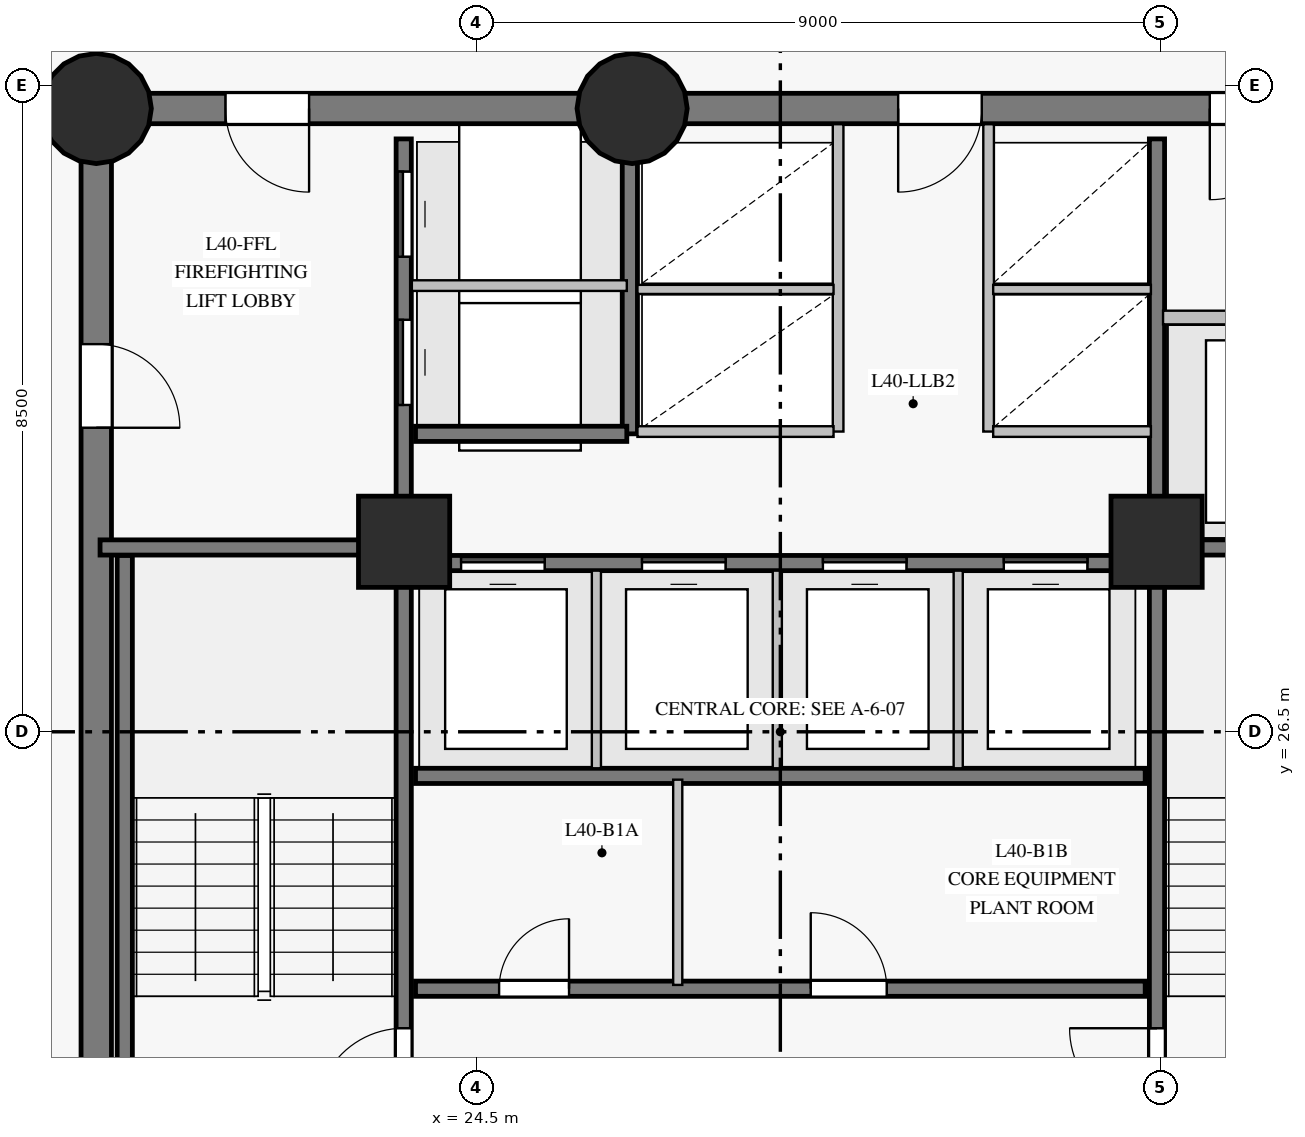
"""IFC4 building model, lengths in metres.
Left out: names, types, materials, properties, quantities, classifications, styles, units other than length and angle.
Written with IfcOpenShell. Run it as: python <this file> out.ifc"""

import sys

from ifc_helpers import new_model, si_unit, direction, frame, frame_2d, origin, origin_with_axes, origin_2d, place, context, subcontext, project, spatial, rectangle, circle, extrude, source, transform, mapped, element, fill, save


model = new_model("IFC4")
c1 = context("Model", 3, precision=1e-05, world=origin(), true_north=direction((0.0, 1.0)))
c2 = subcontext(c1, "Body", "Model", "MODEL_VIEW")
j1 = project(units=[si_unit("LENGTHUNIT", "METRE"), si_unit("PLANEANGLEUNIT", "RADIAN")], contexts=[c1])
p1 = place(None, origin())
s1 = spatial("IfcSite", under=j1, at=p1, CompositionType="ELEMENT")
p2 = place(p1, origin())
s2 = spatial("IfcBuilding", under=s1, at=p2, CompositionType="ELEMENT")
p3 = place(p2, frame((0.0, 0.0, 141.95)))
s3 = spatial("IfcBuildingStorey", under=s2, at=p3, CompositionType="ELEMENT", Elevation=141.95)
p4 = place(p3, frame((37.5, 34.7, 0.0), z_axis=(0.0, 0.0, 1.0), x_axis=(-1.0, 0.0, 0.0)))
e1 = element("IfcWall", 1, at=p4, inside=s3, PredefinedType="SHEAR", context=c2, shape_type="SweptSolid", body=[
    extrude(rectangle(XDim=10.95, YDim=0.4, at=frame_2d((5.475, 0.0))), origin(), (0.0, 0.0, 1.0), 2.825),
])
p5 = place(p4, frame((2.15, 0.0, 0.0)))
e2 = element("IfcOpeningElement", 2, at=p5, cuts=e1, PredefinedType="OPENING", context=c2, shape_type="SweptSolid", body=[
    extrude(rectangle(XDim=1.2, YDim=2.15, at=frame_2d((0.6, 1.075))), frame((0.0, 0.21, 0.0), z_axis=(0.0, -1.0, 0.0), x_axis=(1.0, 0.0, 0.0)), (0.0, 0.0, 1.0), 0.42),
])
p6 = place(p4, frame((6.35, 0.0, 0.0)))
e3 = element("IfcOpeningElement", 3, at=p6, cuts=e1, PredefinedType="OPENING", context=c2, shape_type="SweptSolid", body=[
    extrude(rectangle(XDim=1.1, YDim=2.15, at=frame_2d((0.55, 1.075))), frame((0.0, 0.21, 0.0), z_axis=(0.0, -1.0, 0.0), x_axis=(1.0, 0.0, 0.0)), (0.0, 0.0, 1.0), 0.42),
])
p7 = place(p3, frame((26.55, 34.7, 0.0), z_axis=(0.0, 0.0, 1.0), x_axis=(-1.0, 0.0, 0.0)))
e4 = element("IfcWall", 4, at=p7, inside=s3, PredefinedType="SHEAR", context=c2, shape_type="SweptSolid", body=[
    extrude(rectangle(XDim=7.05, YDim=0.4, at=frame_2d((3.525, 0.0))), origin(), (0.0, 0.0, 1.0), 2.825),
])
p8 = place(p7, frame((4.25, 0.0, 0.0)))
e5 = element("IfcOpeningElement", 5, at=p8, cuts=e4, PredefinedType="OPENING", context=c2, shape_type="SweptSolid", body=[
    extrude(rectangle(XDim=1.1, YDim=2.15, at=frame_2d((0.55, 1.075))), frame((0.0, 0.21, 0.0), z_axis=(0.0, -1.0, 0.0), x_axis=(1.0, 0.0, 0.0)), (0.0, 0.0, 1.0), 0.42),
])
p9 = place(p3, frame((19.5, 34.7, 0.0), z_axis=(0.0, 0.0, 1.0), x_axis=(0.0, -1.0, 0.0)))
e6 = element("IfcWall", 6, at=p9, inside=s3, PredefinedType="SHEAR", context=c2, shape_type="SweptSolid", body=[
    extrude(rectangle(XDim=16.4, YDim=0.4, at=frame_2d((8.2, 0.0))), origin(), (0.0, 0.0, 1.0), 2.825),
])
p10 = place(p9, frame((3.1, 0.0, 0.0)))
e7 = element("IfcOpeningElement", 7, at=p10, cuts=e6, PredefinedType="OPENING", context=c2, shape_type="SweptSolid", body=[
    extrude(rectangle(XDim=1.1, YDim=2.15, at=frame_2d((0.55, 1.075))), frame((0.0, 0.21, 0.0), z_axis=(0.0, -1.0, 0.0), x_axis=(1.0, 0.0, 0.0)), (0.0, 0.0, 1.0), 0.42),
])
m1 = source(origin_with_axes(), c2, "Body", "SweptSolid", [
    extrude(circle(Radius=0.725, at=origin_2d()), origin(), (0.0, 0.0, 1.0), 3.05),
])
for number, where, z_axis, x_axis in (
    (8, (19.5, 34.7, 0.0), (0.0, 0.0, 1.0), (1.0, 0.0, 0.0)),
    (9, (26.55, 34.7, 0.0), (0.0, 0.0, 1.0), (1.0, 0.0, 0.0)),
):
    element("IfcColumn", number, at=place(p3, frame(where, z_axis=z_axis, x_axis=x_axis)), inside=s3, PredefinedType="COLUMN", context=c2, shape_type="MappedRepresentation", body=[
        mapped(m1, transform((0.0, 0.0, 0.0), scale=1.0)),
    ])
m2 = source(origin_with_axes(), c2, "Body", "SweptSolid", [
    extrude(rectangle(XDim=1.2, YDim=1.2, at=origin_2d()), origin(), (0.0, 0.0, 1.0), 3.05),
])
for number, where, z_axis, x_axis in (
    (10, (23.55, 29.0, 0.0), (0.0, 0.0, 1.0), (1.0, 0.0, 0.0)),
    (11, (33.45, 29.0, 0.0), (0.0, 0.0, 1.0), (1.0, 0.0, 0.0)),
):
    element("IfcColumn", number, at=place(p3, frame(where, z_axis=z_axis, x_axis=x_axis)), inside=s3, PredefinedType="COLUMN", context=c2, shape_type="MappedRepresentation", body=[
        mapped(m2, transform((0.0, 0.0, 0.0), scale=1.0)),
    ])
p11 = place(p3, frame((23.545, 18.7, 0.0), z_axis=(0.0, 0.0, 1.0), x_axis=(0.0, 1.0, 0.0)))
e12 = element("IfcWall", 12, at=p11, inside=s3, PredefinedType="SHEAR", context=c2, shape_type="SweptSolid", body=[
    extrude(rectangle(XDim=15.6, YDim=0.2, at=frame_2d((7.8, 0.0))), origin(), (0.0, 0.0, 1.0), 2.825),
])
p12 = place(p11, frame((2.75, 0.0, 0.0)))
e13 = element("IfcOpeningElement", 13, at=p12, cuts=e12, PredefinedType="OPENING", context=c2, shape_type="SweptSolid", body=[
    extrude(rectangle(XDim=1.15, YDim=2.15, at=frame_2d((0.575, 1.075))), frame((0.0, 0.11, 0.0), z_axis=(0.0, -1.0, 0.0), x_axis=(1.0, 0.0, 0.0)), (0.0, 0.0, 1.0), 0.22),
])
p13 = place(p11, frame((0.14, 0.0, 0.0)))
e14 = element("IfcOpeningElement", 14, at=p13, cuts=e12, PredefinedType="OPENING", context=c2, shape_type="SweptSolid", body=[
    extrude(rectangle(XDim=0.88, YDim=2.1, at=frame_2d((0.44, 1.05))), frame((0.0, 0.11, 0.0), z_axis=(0.0, -1.0, 0.0), x_axis=(1.0, 0.0, 0.0)), (0.0, 0.0, 1.0), 0.22),
])
p14 = place(p11, frame((1.36, 0.0, 0.0)))
e15 = element("IfcOpeningElement", 15, at=p14, cuts=e12, PredefinedType="OPENING", context=c2, shape_type="SweptSolid", body=[
    extrude(rectangle(XDim=0.88, YDim=2.1, at=frame_2d((0.44, 1.05))), frame((0.0, 0.11, 0.0), z_axis=(0.0, -1.0, 0.0), x_axis=(1.0, 0.0, 0.0)), (0.0, 0.0, 1.0), 0.22),
])
p15 = place(p11, frame((12.1, 0.0, 0.0)))
e16 = element("IfcOpeningElement", 16, at=p15, cuts=e12, PredefinedType="OPENING", context=c2, shape_type="SweptSolid", body=[
    extrude(rectangle(XDim=1.12, YDim=2.15, at=frame_2d((0.56, 1.075))), frame((0.0, 0.11, 0.0), z_axis=(0.0, -1.0, 0.0), x_axis=(1.0, 0.0, 0.0)), (0.0, 0.0, 1.0), 0.22),
])
p16 = place(p11, frame((14.05, 0.0, 0.0)))
e17 = element("IfcOpeningElement", 17, at=p16, cuts=e12, PredefinedType="OPENING", context=c2, shape_type="SweptSolid", body=[
    extrude(rectangle(XDim=1.12, YDim=2.15, at=frame_2d((0.56, 1.075))), frame((0.0, 0.11, 0.0), z_axis=(0.0, -1.0, 0.0), x_axis=(1.0, 0.0, 0.0)), (0.0, 0.0, 1.0), 0.22),
])
p17 = place(p3, frame((33.455, 18.7, 0.0), z_axis=(0.0, 0.0, 1.0), x_axis=(0.0, 1.0, 0.0)))
e18 = element("IfcWall", 18, at=p17, inside=s3, PredefinedType="SHEAR", context=c2, shape_type="SweptSolid", body=[
    extrude(rectangle(XDim=15.6, YDim=0.2, at=frame_2d((7.8, 0.0))), origin(), (0.0, 0.0, 1.0), 2.825),
])
p18 = place(p17, frame((2.75, 0.0, 0.0)))
e19 = element("IfcOpeningElement", 19, at=p18, cuts=e18, PredefinedType="OPENING", context=c2, shape_type="SweptSolid", body=[
    extrude(rectangle(XDim=1.15, YDim=2.15, at=frame_2d((0.575, 1.075))), frame((0.0, 0.11, 0.0), z_axis=(0.0, -1.0, 0.0), x_axis=(1.0, 0.0, 0.0)), (0.0, 0.0, 1.0), 0.22),
])
p19 = place(p17, frame((0.55, 0.0, 0.0)))
e20 = element("IfcOpeningElement", 20, at=p19, cuts=e18, PredefinedType="OPENING", context=c2, shape_type="SweptSolid", body=[
    extrude(rectangle(XDim=0.94, YDim=2.1, at=frame_2d((0.47, 1.05))), frame((0.0, 0.11, 0.0), z_axis=(0.0, -1.0, 0.0), x_axis=(1.0, 0.0, 0.0)), (0.0, 0.0, 1.0), 0.22),
])
p20 = place(p3, frame((23.7, 23.12, 0.0), z_axis=(0.0, 0.0, 1.0), x_axis=(1.0, 0.0, 0.0)))
e21 = element("IfcWall", 21, at=p20, inside=s3, PredefinedType="SHEAR", context=c2, shape_type="SweptSolid", body=[
    extrude(rectangle(XDim=9.6, YDim=0.2, at=frame_2d((4.8, 0.0))), origin(), (0.0, 0.0, 1.0), 2.825),
])
p21 = place(p20, frame((1.1, 0.0, 0.0)))
e22 = element("IfcOpeningElement", 22, at=p21, cuts=e21, PredefinedType="OPENING", context=c2, shape_type="SweptSolid", body=[
    extrude(rectangle(XDim=0.92, YDim=2.1, at=frame_2d((0.46, 1.05))), frame((0.0, 0.11, 0.0), z_axis=(0.0, -1.0, 0.0), x_axis=(1.0, 0.0, 0.0)), (0.0, 0.0, 1.0), 0.22),
])
p22 = place(p20, frame((5.2, 0.0, 0.0)))
e23 = element("IfcOpeningElement", 23, at=p22, cuts=e21, PredefinedType="OPENING", context=c2, shape_type="SweptSolid", body=[
    extrude(rectangle(XDim=1.0, YDim=2.15, at=frame_2d((0.5, 1.075))), frame((0.0, 0.11, 0.0), z_axis=(0.0, -1.0, 0.0), x_axis=(1.0, 0.0, 0.0)), (0.0, 0.0, 1.0), 0.22),
])
p23 = place(p3, frame((23.7, 25.92, 0.0), z_axis=(0.0, 0.0, 1.0), x_axis=(1.0, 0.0, 0.0)))
e24 = element("IfcWall", 24, at=p23, inside=s3, PredefinedType="SHEAR", context=c2, shape_type="SweptSolid", body=[
    extrude(rectangle(XDim=9.6, YDim=0.2, at=frame_2d((4.8, 0.0))), origin(), (0.0, 0.0, 1.0), 2.825),
])
p24 = place(p3, frame((23.7, 28.72, 0.0), z_axis=(0.0, 0.0, 1.0), x_axis=(1.0, 0.0, 0.0)))
e25 = element("IfcWall", 25, at=p24, inside=s3, PredefinedType="SHEAR", context=c2, shape_type="SweptSolid", body=[
    extrude(rectangle(XDim=9.6, YDim=0.2, at=frame_2d((4.8, 0.0))), origin(), (0.0, 0.0, 1.0), 2.825),
])
p25 = place(p24, frame((0.6, 0.0, 0.0)))
e26 = element("IfcOpeningElement", 26, at=p25, cuts=e25, PredefinedType="OPENING", context=c2, shape_type="SweptSolid", body=[
    extrude(rectangle(XDim=1.1, YDim=2.15, at=frame_2d((0.55, 1.075))), frame((0.0, 0.11, 0.0), z_axis=(0.0, -1.0, 0.0), x_axis=(1.0, 0.0, 0.0)), (0.0, 0.0, 1.0), 0.22),
])
p26 = place(p24, frame((2.98, 0.0, 0.0)))
e27 = element("IfcOpeningElement", 27, at=p26, cuts=e25, PredefinedType="OPENING", context=c2, shape_type="SweptSolid", body=[
    extrude(rectangle(XDim=1.1, YDim=2.15, at=frame_2d((0.55, 1.075))), frame((0.0, 0.11, 0.0), z_axis=(0.0, -1.0, 0.0), x_axis=(1.0, 0.0, 0.0)), (0.0, 0.0, 1.0), 0.22),
])
p27 = place(p24, frame((5.36, 0.0, 0.0)))
e28 = element("IfcOpeningElement", 28, at=p27, cuts=e25, PredefinedType="OPENING", context=c2, shape_type="SweptSolid", body=[
    extrude(rectangle(XDim=1.1, YDim=2.15, at=frame_2d((0.55, 1.075))), frame((0.0, 0.11, 0.0), z_axis=(0.0, -1.0, 0.0), x_axis=(1.0, 0.0, 0.0)), (0.0, 0.0, 1.0), 0.22),
])
p28 = place(p24, frame((7.74, 0.0, 0.0)))
e29 = element("IfcOpeningElement", 29, at=p28, cuts=e25, PredefinedType="OPENING", context=c2, shape_type="SweptSolid", body=[
    extrude(rectangle(XDim=1.1, YDim=2.15, at=frame_2d((0.55, 1.075))), frame((0.0, 0.11, 0.0), z_axis=(0.0, -1.0, 0.0), x_axis=(1.0, 0.0, 0.0)), (0.0, 0.0, 1.0), 0.22),
])
p29 = place(p3, frame((19.875, 21.32, 0.0), z_axis=(0.0, 0.0, 1.0), x_axis=(0.0, 1.0, 0.0)))
e30 = element("IfcWall", 30, at=p29, inside=s3, PredefinedType="SHEAR", context=c2, shape_type="SweptSolid", body=[
    extrude(rectangle(XDim=7.5, YDim=0.2, at=frame_2d((3.75, 0.0))), origin(), (0.0, 0.0, 1.0), 2.825),
])
for number, where, z_axis, x_axis in (
    (31, (33.455, 28.925, 0.0), (0.0, 0.0, 1.0), (1.0, 0.0, 0.0)),
    (32, (19.55, 28.925, 0.0), (0.0, 0.0, 1.0), (1.0, 0.0, 0.0)),
):
    element("IfcWall", number, at=place(p3, frame(where, z_axis=z_axis, x_axis=x_axis)), inside=s3, PredefinedType="SHEAR", context=c2, shape_type="SweptSolid", body=[
        extrude(rectangle(XDim=3.995, YDim=0.2, at=frame_2d((1.998, 0.0))), origin(), (0.0, 0.0, 1.0), 2.825),
    ])
p30 = place(p3, frame((26.52, 30.42, 0.0), z_axis=(0.0, 0.0, 1.0), x_axis=(0.0, 1.0, 0.0)))
e33 = element("IfcWall", 33, at=p30, inside=s3, PredefinedType="SHEAR", context=c2, shape_type="SweptSolid", body=[
    extrude(rectangle(XDim=3.86, YDim=0.2, at=frame_2d((1.93, 0.0))), origin(), (0.0, 0.0, 1.0), 2.825),
])
p31 = place(p3, frame((23.7, 30.42, 0.0), z_axis=(0.0, 0.0, 1.0), x_axis=(1.0, 0.0, 0.0)))
e34 = element("IfcWall", 34, at=p31, inside=s3, PredefinedType="SHEAR", context=c2, shape_type="SweptSolid", body=[
    extrude(rectangle(XDim=2.78, YDim=0.2, at=frame_2d((1.39, 0.0))), origin(), (0.0, 0.0, 1.0), 2.825),
])
for number, where, z_axis, x_axis in (
    (35, (29.26, 30.45, 0.0), (0.0, 0.0, 1.0), (0.0, 1.0, 0.0)),
    (36, (31.24, 30.45, 0.0), (0.0, 0.0, 1.0), (0.0, 1.0, 0.0)),
):
    element("IfcWall", number, at=place(p3, frame(where, z_axis=z_axis, x_axis=x_axis)), inside=s3, PredefinedType="PARTITIONING", context=c2, shape_type="SweptSolid", body=[
        extrude(rectangle(XDim=4.043, YDim=0.14, at=frame_2d((2.021, 0.0))), origin(), (0.0, 0.0, 1.0), 2.825),
    ])
p32 = place(p3, frame((33.535, 31.95, 0.0), z_axis=(0.0, 0.0, 1.0), x_axis=(1.0, 0.0, 0.0)))
e37 = element("IfcWall", 37, at=p32, inside=s3, PredefinedType="PARTITIONING", context=c2, shape_type="SweptSolid", body=[
    extrude(rectangle(XDim=3.759, YDim=0.18, at=frame_2d((1.879, 0.0))), origin(), (0.0, 0.0, 1.0), 2.825),
])
p33 = place(p32, frame((0.9, 0.0, 0.0)))
e38 = element("IfcOpeningElement", 38, at=p33, cuts=e37, PredefinedType="OPENING", context=c2, shape_type="SweptSolid", body=[
    extrude(rectangle(XDim=1.3, YDim=2.2, at=frame_2d((0.65, 1.1))), frame((0.0, 0.1, 0.0), z_axis=(0.0, -1.0, 0.0), x_axis=(1.0, 0.0, 0.0)), (0.0, 0.0, 1.0), 0.2),
])
p34 = place(p3, frame((23.652, 32.37, 0.0), z_axis=(0.0, 0.0, 1.0), x_axis=(1.0, 0.0, 0.0)))
e39 = element("IfcWall", 39, at=p34, inside=s3, PredefinedType="PARTITIONING", context=c2, shape_type="SweptSolid", body=[
    extrude(rectangle(XDim=2.828, YDim=0.14, at=frame_2d((1.414, 0.0))), origin(), (0.0, 0.0, 1.0), 2.825),
])
p35 = place(p3, frame((27.15, 23.17, 0.0), z_axis=(0.0, 0.0, 1.0), x_axis=(0.0, 1.0, 0.0)))
e40 = element("IfcWall", 40, at=p35, inside=s3, PredefinedType="PARTITIONING", context=c2, shape_type="SweptSolid", body=[
    extrude(rectangle(XDim=2.7, YDim=0.12, at=frame_2d((1.35, 0.0))), origin(), (0.0, 0.0, 1.0), 2.825),
])
for number, where, z_axis, x_axis in (
    (41, (26.08, 26.02, 0.0), (0.0, 0.0, 1.0), (0.0, 1.0, 0.0)),
    (42, (28.46, 26.02, 0.0), (0.0, 0.0, 1.0), (0.0, 1.0, 0.0)),
    (43, (30.84, 26.02, 0.0), (0.0, 0.0, 1.0), (0.0, 1.0, 0.0)),
):
    element("IfcWall", number, at=place(p3, frame(where, z_axis=z_axis, x_axis=x_axis)), inside=s3, PredefinedType="PARTITIONING", context=c2, shape_type="SweptSolid", body=[
        extrude(rectangle(XDim=2.6, YDim=0.12, at=frame_2d((1.3, 0.0))), origin(), (0.0, 0.0, 1.0), 2.825),
    ])
p36 = place(p3, frame((26.62, 30.45, 0.0), z_axis=(0.0, 0.0, 1.0), x_axis=(1.0, 0.0, 0.0)))
e44 = element("IfcWall", 44, at=p36, inside=s3, PredefinedType="PARTITIONING", context=c2, shape_type="SweptSolid", body=[
    extrude(rectangle(XDim=2.58, YDim=0.14, at=frame_2d((1.29, 0.0))), origin(), (0.0, 0.0, 1.0), 2.825),
])
p37 = place(p3, frame((26.62, 32.32, 0.0), z_axis=(0.0, 0.0, 1.0), x_axis=(1.0, 0.0, 0.0)))
e45 = element("IfcWall", 45, at=p37, inside=s3, PredefinedType="PARTITIONING", context=c2, shape_type="SweptSolid", body=[
    extrude(rectangle(XDim=2.58, YDim=0.12, at=frame_2d((1.29, 0.0))), origin(), (0.0, 0.0, 1.0), 2.825),
])
p38 = place(p3, frame((31.3, 30.45, 0.0), z_axis=(0.0, 0.0, 1.0), x_axis=(1.0, 0.0, 0.0)))
e46 = element("IfcWall", 46, at=p38, inside=s3, PredefinedType="PARTITIONING", context=c2, shape_type="SweptSolid", body=[
    extrude(rectangle(XDim=2.075, YDim=0.14, at=frame_2d((1.038, 0.0))), origin(), (0.0, 0.0, 1.0), 2.825),
])
p39 = place(p3, frame((31.3, 32.32, 0.0), z_axis=(0.0, 0.0, 1.0), x_axis=(1.0, 0.0, 0.0)))
e47 = element("IfcWall", 47, at=p39, inside=s3, PredefinedType="PARTITIONING", context=c2, shape_type="SweptSolid", body=[
    extrude(rectangle(XDim=2.075, YDim=0.12, at=frame_2d((1.038, 0.0))), origin(), (0.0, 0.0, 1.0), 2.825),
])
m3 = source(origin_with_axes(), c2, "Body", "SweptSolid", [
    extrude(rectangle(XDim=1.15, YDim=2.15, at=frame_2d((0.575, 1.075))), frame((0.0, 0.025, 0.0), z_axis=(0.0, -1.0, 0.0), x_axis=(1.0, 0.0, 0.0)), (0.0, 0.0, 1.0), 0.05),
])
p40 = place(p12, origin())
e48 = element("IfcDoor", 48, at=p40, inside=s3, OperationType="SINGLE_SWING_LEFT", PredefinedType="DOOR", context=c2, shape_type="MappedRepresentation", body=[
    mapped(m3, transform((0.0, 0.0, 0.0), scale=1.0)),
])
fill(e13, e48)
p41 = place(p18, origin())
e49 = element("IfcDoor", 49, at=p41, inside=s3, OperationType="SINGLE_SWING_RIGHT", PredefinedType="DOOR", context=c2, shape_type="MappedRepresentation", body=[
    mapped(m3, transform((0.0, 0.0, 0.0), scale=1.0)),
])
fill(e19, e49)
m4 = source(origin_with_axes(), c2, "Body", "SweptSolid", [
    extrude(rectangle(XDim=1.1, YDim=2.15, at=frame_2d((0.55, 1.075))), frame((0.0, 0.025, 0.0), z_axis=(0.0, -1.0, 0.0), x_axis=(1.0, 0.0, 0.0)), (0.0, 0.0, 1.0), 0.05),
])
p42 = place(p8, origin())
e50 = element("IfcDoor", 50, at=p42, inside=s3, OperationType="SINGLE_SWING_LEFT", PredefinedType="DOOR", context=c2, shape_type="MappedRepresentation", body=[
    mapped(m4, transform((0.0, 0.0, 0.0), scale=1.0)),
])
fill(e5, e50)
p43 = place(p10, origin())
e51 = element("IfcDoor", 51, at=p43, inside=s3, OperationType="SINGLE_SWING_RIGHT", PredefinedType="DOOR", context=c2, shape_type="MappedRepresentation", body=[
    mapped(m4, transform((0.0, 0.0, 0.0), scale=1.0)),
])
fill(e7, e51)
m5 = source(origin_with_axes(), c2, "Body", "SweptSolid", [
    extrude(rectangle(XDim=1.2, YDim=2.15, at=frame_2d((0.6, 1.075))), frame((0.0, 0.025, 0.0), z_axis=(0.0, -1.0, 0.0), x_axis=(1.0, 0.0, 0.0)), (0.0, 0.0, 1.0), 0.05),
])
p44 = place(p5, origin())
e52 = element("IfcDoor", 52, at=p44, inside=s3, OperationType="SINGLE_SWING_RIGHT", PredefinedType="DOOR", context=c2, shape_type="MappedRepresentation", body=[
    mapped(m5, transform((0.0, 0.0, 0.0), scale=1.0)),
])
fill(e2, e52)
m6 = source(origin_with_axes(), c2, "Body", "SweptSolid", [
    extrude(rectangle(XDim=0.92, YDim=2.1, at=frame_2d((0.46, 1.05))), frame((0.0, 0.025, 0.0), z_axis=(0.0, -1.0, 0.0), x_axis=(1.0, 0.0, 0.0)), (0.0, 0.0, 1.0), 0.05),
])
p45 = place(p21, origin())
e53 = element("IfcDoor", 53, at=p45, inside=s3, OperationType="SINGLE_SWING_RIGHT", PredefinedType="DOOR", context=c2, shape_type="MappedRepresentation", body=[
    mapped(m6, transform((0.0, 0.0, 0.0), scale=1.0)),
])
fill(e22, e53)
m7 = source(origin_with_axes(), c2, "Body", "SweptSolid", [
    extrude(rectangle(XDim=1.0, YDim=2.15, at=frame_2d((0.5, 1.075))), frame((0.0, 0.025, 0.0), z_axis=(0.0, -1.0, 0.0), x_axis=(1.0, 0.0, 0.0)), (0.0, 0.0, 1.0), 0.05),
])
p46 = place(p22, origin())
e54 = element("IfcDoor", 54, at=p46, inside=s3, OperationType="SINGLE_SWING_LEFT", PredefinedType="DOOR", context=c2, shape_type="MappedRepresentation", body=[
    mapped(m7, transform((0.0, 0.0, 0.0), scale=1.0)),
])
fill(e23, e54)
p47 = place(p25, origin())
e55 = element("IfcDoor", 55, at=p47, inside=s3, OperationType="SLIDING_TO_LEFT", PredefinedType="DOOR", context=c2, shape_type="MappedRepresentation", body=[
    mapped(m4, transform((0.0, 0.0, 0.0), scale=1.0)),
])
fill(e26, e55)
p48 = place(p26, origin())
e56 = element("IfcDoor", 56, at=p48, inside=s3, OperationType="SLIDING_TO_RIGHT", PredefinedType="DOOR", context=c2, shape_type="MappedRepresentation", body=[
    mapped(m4, transform((0.0, 0.0, 0.0), scale=1.0)),
])
fill(e27, e56)
p49 = place(p27, origin())
e57 = element("IfcDoor", 57, at=p49, inside=s3, OperationType="SLIDING_TO_LEFT", PredefinedType="DOOR", context=c2, shape_type="MappedRepresentation", body=[
    mapped(m4, transform((0.0, 0.0, 0.0), scale=1.0)),
])
fill(e28, e57)
p50 = place(p28, origin())
e58 = element("IfcDoor", 58, at=p50, inside=s3, OperationType="SLIDING_TO_RIGHT", PredefinedType="DOOR", context=c2, shape_type="MappedRepresentation", body=[
    mapped(m4, transform((0.0, 0.0, 0.0), scale=1.0)),
])
fill(e29, e58)
p51 = place(p6, origin())
e59 = element("IfcDoor", 59, at=p51, inside=s3, OperationType="SINGLE_SWING_RIGHT", PredefinedType="DOOR", context=c2, shape_type="MappedRepresentation", body=[
    mapped(m4, transform((0.0, 0.0, 0.0), scale=1.0)),
])
fill(e3, e59)
m8 = source(origin_with_axes(), c2, "Body", "SweptSolid", [
    extrude(rectangle(XDim=1.12, YDim=2.15, at=frame_2d((0.56, 1.075))), frame((0.0, 0.025, 0.0), z_axis=(0.0, -1.0, 0.0), x_axis=(1.0, 0.0, 0.0)), (0.0, 0.0, 1.0), 0.05),
])
p52 = place(p15, origin())
e60 = element("IfcDoor", 60, at=p52, inside=s3, OperationType="SLIDING_TO_LEFT", PredefinedType="DOOR", context=c2, shape_type="MappedRepresentation", body=[
    mapped(m8, transform((0.0, 0.0, 0.0), scale=1.0)),
])
fill(e16, e60)
p53 = place(p16, origin())
e61 = element("IfcDoor", 61, at=p53, inside=s3, OperationType="SLIDING_TO_RIGHT", PredefinedType="DOOR", context=c2, shape_type="MappedRepresentation", body=[
    mapped(m8, transform((0.0, 0.0, 0.0), scale=1.0)),
])
fill(e17, e61)
save(model, sys.argv[1])
